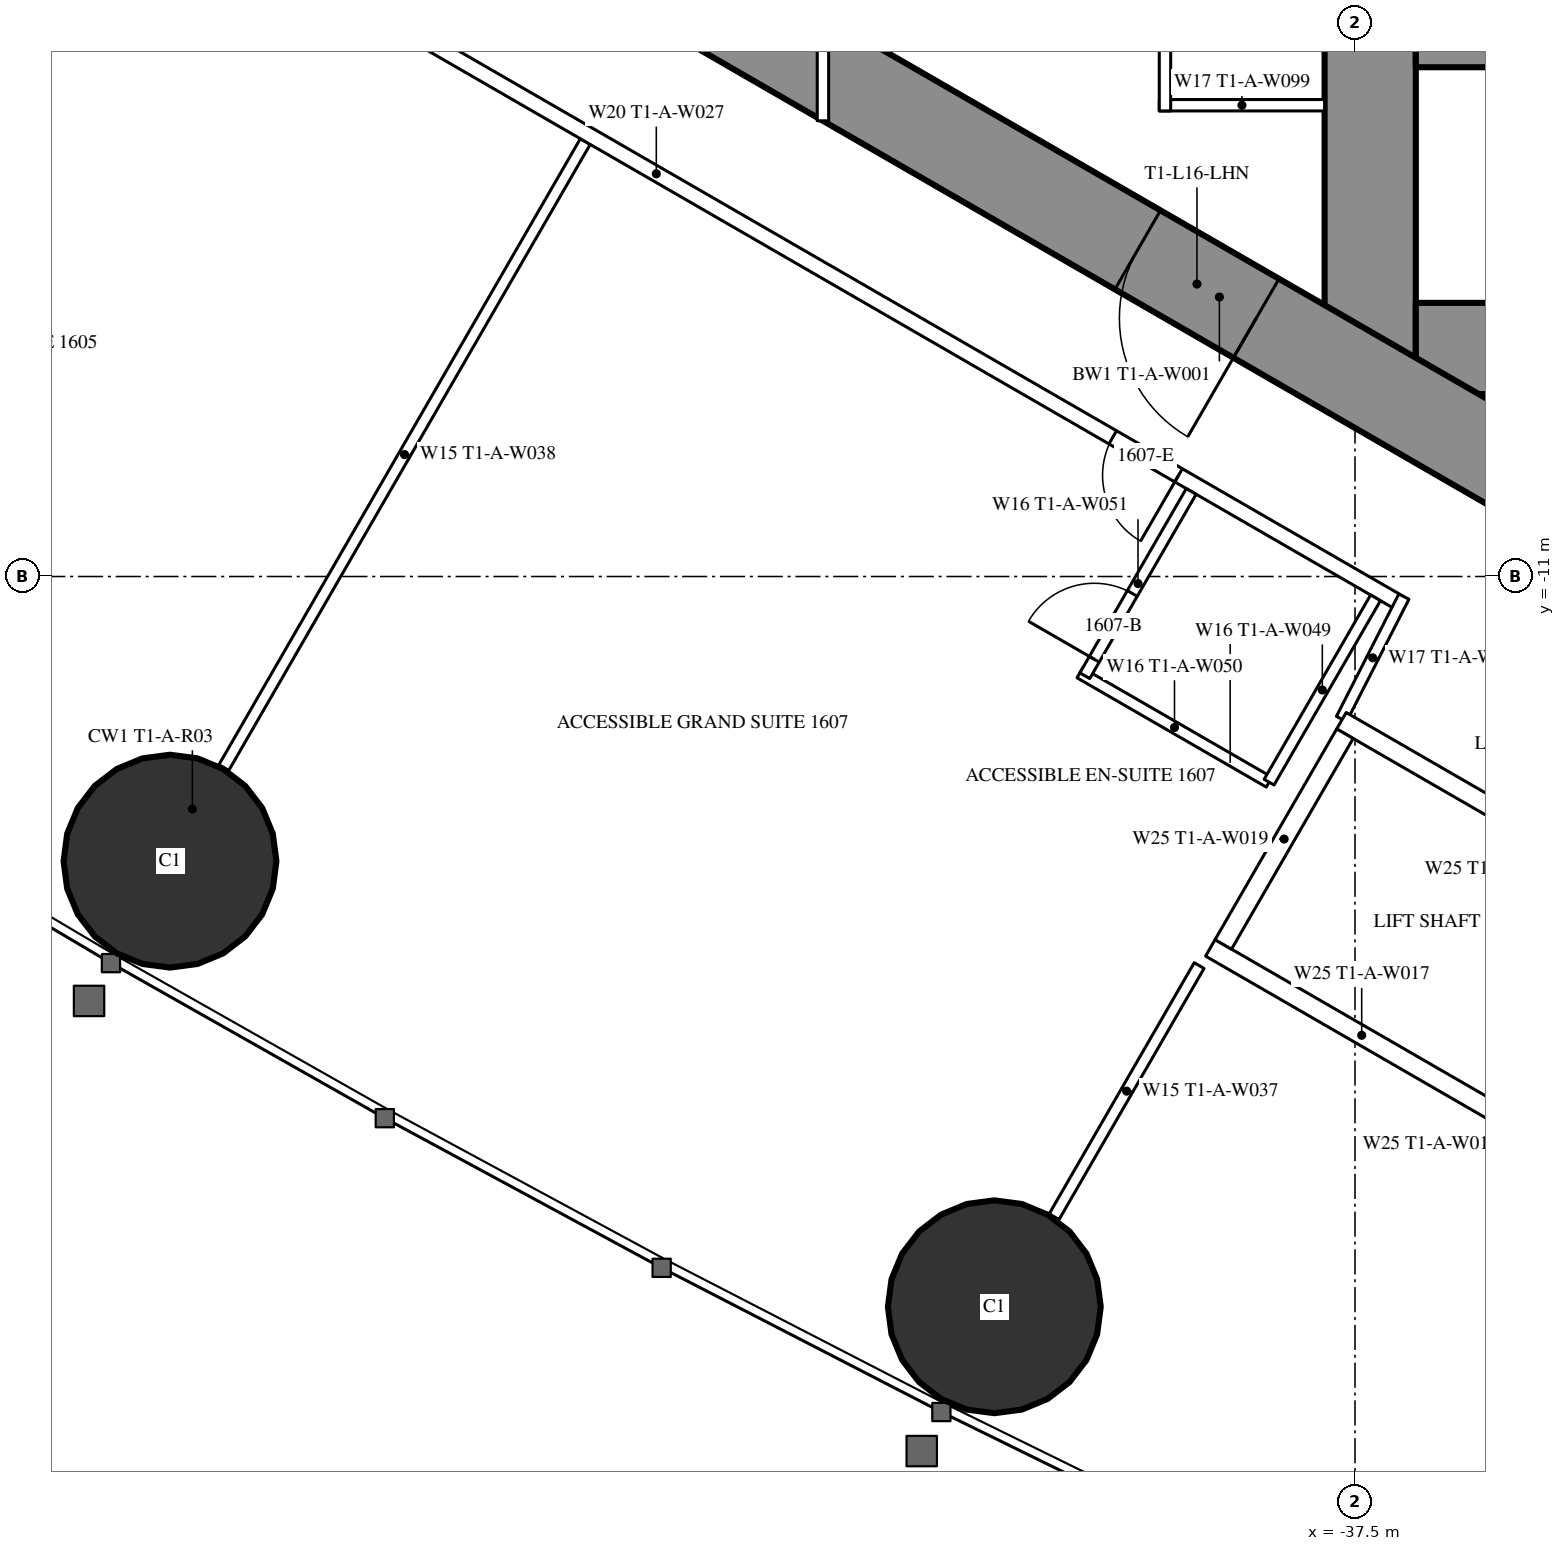
"""IFC4 building model, lengths in metres.
Left out: names, types, materials, properties, quantities, classifications, styles, units other than length and angle.
Written with IfcOpenShell. Run it as: python <this file> out.ifc"""

import sys

from ifc_helpers import new_model, si_unit, direction, frame, frame_2d, origin, origin_2d, place, context, subcontext, project, spatial, rectangle, hollow_circle, extrude, element, fill, save


model = new_model("IFC4")
c1 = context("Model", 3, precision=1e-05, world=origin(), true_north=direction((0.0, 1.0)))
c2 = subcontext(c1, "Body", "Model", "MODEL_VIEW")
j1 = project(units=[si_unit("LENGTHUNIT", "METRE"), si_unit("PLANEANGLEUNIT", "RADIAN")], contexts=[c1])
p1 = place(None, origin())
s1 = spatial("IfcSite", under=j1, at=p1, CompositionType="ELEMENT")
p2 = place(p1, origin())
s2 = spatial("IfcBuilding", under=s1, at=p2, CompositionType="ELEMENT")
p3 = place(p2, frame((0.0, 0.0, 63.5)))
s3 = spatial("IfcBuildingStorey", under=s2, at=p3, CompositionType="ELEMENT", Elevation=63.5)
for number, where, z_axis, x_axis in (
    (1, (-53.09, -14.745, 0.0), (0.0, 0.0, 1.0), (1.0, 0.0, 0.0)),
    (2, (-42.245, -20.607, 0.0), (0.0, 0.0, 1.0), (1.0, 0.0, 0.0)),
):
    element("IfcColumn", number, at=place(p3, frame(where, z_axis=z_axis, x_axis=x_axis)), inside=s3, PredefinedType="COLUMN", context=c2, shape_type="SweptSolid", body=[
        extrude(hollow_circle(Radius=1.4, WallThickness=0.12, at=origin_2d()), origin(), (0.0, 0.0, 1.0), 3.5),
    ])
p4 = place(p3, frame((-37.3, 8.6, 0.0), z_axis=(0.0, 0.0, 1.0), x_axis=(0.0, -1.0, 0.0)))
e3 = element("IfcWall", 3, at=p4, inside=s3, PredefinedType="SHEAR", context=c2, shape_type="SweptSolid", body=[
    extrude(rectangle(XDim=17.2, YDim=1.2, at=frame_2d((8.6, 0.0))), origin(), (0.0, 0.0, 1.0), 3.5),
])
p5 = place(p4, frame((7.7, 0.0, 0.0)))
e4 = element("IfcOpeningElement", 4, at=p5, cuts=e3, PredefinedType="OPENING", context=c2, shape_type="SweptSolid", body=[
    extrude(rectangle(XDim=1.8, YDim=2.2, at=frame_2d((0.9, 1.1))), frame((0.0, 0.61, 0.0), z_axis=(0.0, -1.0, 0.0), x_axis=(1.0, 0.0, 0.0)), (0.0, 0.0, 1.0), 1.22),
])
p6 = place(p3, frame((-28.3, -8.0, 0.0), z_axis=(0.0, 0.0, 1.0), x_axis=(-1.0, 0.0, 0.0)))
e5 = element("IfcWall", 5, at=p6, inside=s3, PredefinedType="SHEAR", context=c2, shape_type="SweptSolid", body=[
    extrude(rectangle(XDim=8.4, YDim=1.2, at=frame_2d((4.2, 0.0))), origin(), (0.0, 0.0, 1.0), 3.5),
])
p7 = place(p6, frame((0.25, 0.0, 0.0)))
e6 = element("IfcOpeningElement", 6, at=p7, cuts=e5, PredefinedType="OPENING", context=c2, shape_type="SweptSolid", body=[
    extrude(rectangle(XDim=1.0, YDim=2.2, at=frame_2d((0.5, 1.1))), frame((0.0, 0.61, 0.0), z_axis=(0.0, -1.0, 0.0), x_axis=(1.0, 0.0, 0.0)), (0.0, 0.0, 1.0), 1.22),
])
p8 = place(p3, frame((-28.3, -4.15, 0.0), z_axis=(0.0, 0.0, 1.0), x_axis=(-1.0, 0.0, 0.0)))
e7 = element("IfcWall", 7, at=p8, inside=s3, PredefinedType="SHEAR", context=c2, shape_type="SweptSolid", body=[
    extrude(rectangle(XDim=8.4, YDim=0.3, at=frame_2d((4.2, 0.0))), origin(), (0.0, 0.0, 1.0), 3.5),
])
p9 = place(p3, frame((-27.2, -14.3, 0.0), z_axis=(0.0, 0.0, 1.0), x_axis=(-0.866024021859, 0.500002393557, 0.0)))
e8 = element("IfcWall", 8, at=p9, inside=s3, PredefinedType="SHEAR", context=c2, shape_type="SweptSolid", body=[
    extrude(rectangle(XDim=27.907, YDim=1.2, at=frame_2d((13.954, 0.0))), origin(), (0.0, 0.0, 1.0), 3.5),
])
p10 = place(p9, frame((4.6, 0.0, 0.0)))
e9 = element("IfcOpeningElement", 9, at=p10, cuts=e8, PredefinedType="OPENING", context=c2, shape_type="SweptSolid", body=[
    extrude(rectangle(XDim=1.0, YDim=2.2, at=frame_2d((0.5, 1.1))), frame((0.0, 0.61, 0.0), z_axis=(0.0, -1.0, 0.0), x_axis=(1.0, 0.0, 0.0)), (0.0, 0.0, 1.0), 1.22),
])
p11 = place(p9, frame((13.395, 0.0, 0.0)))
e10 = element("IfcOpeningElement", 10, at=p11, cuts=e8, PredefinedType="OPENING", context=c2, shape_type="SweptSolid", body=[
    extrude(rectangle(XDim=1.8, YDim=2.2, at=frame_2d((0.9, 1.1))), frame((0.0, 0.61, 0.0), z_axis=(0.0, -1.0, 0.0), x_axis=(1.0, 0.0, 0.0)), (0.0, 0.0, 1.0), 1.22),
])
p12 = place(p3, frame((-47.627, -5.278, 0.0), z_axis=(0.0, 0.0, 1.0), x_axis=(-0.500009844318, -0.86601972009, 0.0)))
e11 = element("IfcWall", 11, at=p12, inside=s3, PredefinedType="PARTITIONING", context=c2, shape_type="SweptSolid", body=[
    extrude(rectangle(XDim=9.51, YDim=0.15, at=frame_2d((4.755, 0.0))), origin(), (0.0, 0.0, 1.0), 2.25),
])
p13 = place(p3, frame((-39.551, -16.118, 0.0), z_axis=(0.0, 0.0, 1.0), x_axis=(-0.499986503906, -0.866033195618, 0.0)))
e12 = element("IfcWall", 12, at=p13, inside=s3, PredefinedType="PARTITIONING", context=c2, shape_type="SweptSolid", body=[
    extrude(rectangle(XDim=3.815, YDim=0.15, at=frame_2d((1.907, 0.0))), origin(), (0.0, 0.0, 1.0), 3.25),
])
p14 = place(p3, frame((-36.92, -11.344, 0.0), z_axis=(0.0, 0.0, 1.0), x_axis=(-0.866028313256, 0.499994960614, 0.0)))
e13 = element("IfcWall", 13, at=p14, inside=s3, PredefinedType="PARTITIONING", context=c2, shape_type="SweptSolid", body=[
    extrude(rectangle(XDim=22.568, YDim=0.2, at=frame_2d((11.284, 0.0))), origin(), (0.0, 0.0, 1.0), 3.25),
])
p15 = place(p14, frame((18.668, 0.0, 0.0)))
e14 = element("IfcOpeningElement", 14, at=p15, cuts=e13, PredefinedType="OPENING", context=c2, shape_type="SweptSolid", body=[
    extrude(rectangle(XDim=0.95, YDim=2.2, at=frame_2d((0.475, 1.1))), frame((0.0, 0.11, 0.0), z_axis=(0.0, -1.0, 0.0), x_axis=(1.0, 0.0, 0.0)), (0.0, 0.0, 1.0), 0.22),
])
p16 = place(p14, frame((3.35, 0.0, 0.0)))
e15 = element("IfcOpeningElement", 15, at=p16, cuts=e13, PredefinedType="OPENING", context=c2, shape_type="SweptSolid", body=[
    extrude(rectangle(XDim=1.0, YDim=2.2, at=frame_2d((0.5, 1.1))), frame((0.0, 0.11, 0.0), z_axis=(0.0, -1.0, 0.0), x_axis=(1.0, 0.0, 0.0)), (0.0, 0.0, 1.0), 0.22),
])
p17 = place(p3, frame((-36.857, -11.265, 0.0), z_axis=(0.0, 0.0, 1.0), x_axis=(-0.454225294761, -0.890886851176, 0.0)))
e16 = element("IfcWall", 16, at=p17, inside=s3, PredefinedType="PARTITIONING", context=c2, shape_type="SweptSolid", body=[
    extrude(rectangle(XDim=1.807, YDim=0.15, at=frame_2d((0.904, 0.0))), origin(), (0.0, 0.0, 1.0), 3.25),
])
p18 = place(p3, frame((-38.63, -13.705, 0.0), z_axis=(0.0, 0.0, 1.0), x_axis=(-0.866018712932, 0.500011588718, 0.0)))
e17 = element("IfcWall", 17, at=p18, inside=s3, PredefinedType="PARTITIONING", context=c2, shape_type="SweptSolid", body=[
    extrude(rectangle(XDim=2.875, YDim=0.15, at=frame_2d((1.438, 0.0))), origin(), (0.0, 0.0, 1.0), 3.25),
])
p19 = place(p3, frame((-39.655, -9.88, 0.0), z_axis=(0.0, 0.0, 1.0), x_axis=(-0.500049511043, -0.865996816683, 0.0)))
e18 = element("IfcWall", 18, at=p19, inside=s3, PredefinedType="PARTITIONING", context=c2, shape_type="SweptSolid", body=[
    extrude(rectangle(XDim=2.8, YDim=0.15, at=frame_2d((1.4, 0.0))), origin(), (0.0, 0.0, 1.0), 3.25),
])
p20 = place(p19, frame((1.55, 0.0, 0.0)))
e19 = element("IfcOpeningElement", 19, at=p20, cuts=e18, PredefinedType="OPENING", context=c2, shape_type="SweptSolid", body=[
    extrude(rectangle(XDim=1.0, YDim=2.2, at=frame_2d((0.5, 1.1))), frame((0.0, 0.085, 0.0), z_axis=(0.0, -1.0, 0.0), x_axis=(1.0, 0.0, 0.0)), (0.0, 0.0, 1.0), 0.17),
])
p21 = place(p3, frame((-37.23, -11.281, 0.0), z_axis=(0.0, 0.0, 1.0), x_axis=(-0.500049511043, -0.865996816683, 0.0)))
e20 = element("IfcWall", 20, at=p21, inside=s3, PredefinedType="PARTITIONING", context=c2, shape_type="SweptSolid", body=[
    extrude(rectangle(XDim=2.8, YDim=0.15, at=frame_2d((1.4, 0.0))), origin(), (0.0, 0.0, 1.0), 3.25),
])
p22 = place(p3, frame((-37.9, -4.8, 0.0), z_axis=(0.0, 0.0, 1.0), x_axis=(-1.0, 0.0, 0.0)))
e21 = element("IfcWall", 21, at=p22, inside=s3, PredefinedType="PARTITIONING", context=c2, shape_type="SweptSolid", body=[
    extrude(rectangle(XDim=2.175, YDim=0.15, at=frame_2d((1.087, 0.0))), origin(), (0.0, 0.0, 1.0), 3.25),
])
p23 = place(p3, frame((-40.0, -1.125, 0.0), z_axis=(0.0, 0.0, 1.0), x_axis=(0.0, -1.0, 0.0)))
e22 = element("IfcWall", 22, at=p23, inside=s3, PredefinedType="PARTITIONING", context=c2, shape_type="SweptSolid", body=[
    extrude(rectangle(XDim=3.75, YDim=0.15, at=frame_2d((1.875, 0.0))), origin(), (0.0, 0.0, 1.0), 3.25),
])
p24 = place(p23, frame((1.375, 0.0, 0.0)))
e23 = element("IfcOpeningElement", 23, at=p24, cuts=e22, PredefinedType="OPENING", context=c2, shape_type="SweptSolid", body=[
    extrude(rectangle(XDim=1.0, YDim=2.2, at=frame_2d((0.5, 1.1))), frame((0.0, 0.085, 0.0), z_axis=(0.0, -1.0, 0.0), x_axis=(1.0, 0.0, 0.0)), (0.0, 0.0, 1.0), 0.17),
])
p25 = place(p3, frame((-44.5, 5.005, 0.0), z_axis=(0.0, 0.0, 1.0), x_axis=(0.0, -1.0, 0.0)))
e24 = element("IfcWall", 24, at=p25, inside=s3, PredefinedType="PARTITIONING", context=c2, shape_type="SweptSolid", body=[
    extrude(rectangle(XDim=10.009, YDim=0.15, at=frame_2d((5.005, 0.0))), origin(), (0.0, 0.0, 1.0), 2.45),
])
p26 = place(p25, frame((2.002, 0.0, 0.0)))
e25 = element("IfcOpeningElement", 25, at=p26, cuts=e24, PredefinedType="OPENING", context=c2, shape_type="SweptSolid", body=[
    extrude(rectangle(XDim=1.0, YDim=2.2, at=frame_2d((0.5, 1.1))), frame((0.0, 0.085, 0.0), z_axis=(0.0, -1.0, 0.0), x_axis=(1.0, 0.0, 0.0)), (0.0, 0.0, 1.0), 0.17),
])
p27 = place(p25, frame((7.007, 0.0, 0.0)))
e26 = element("IfcOpeningElement", 26, at=p27, cuts=e24, PredefinedType="OPENING", context=c2, shape_type="SweptSolid", body=[
    extrude(rectangle(XDim=1.0, YDim=2.2, at=frame_2d((0.5, 1.1))), frame((0.0, 0.085, 0.0), z_axis=(0.0, -1.0, 0.0), x_axis=(1.0, 0.0, 0.0)), (0.0, 0.0, 1.0), 0.17),
])
p28 = place(p3, frame((-33.696, -15.197, 0.0), z_axis=(0.0, 0.0, 1.0), x_axis=(-0.865976953817, 0.500083908417, 0.0)))
e27 = element("IfcWall", 27, at=p28, inside=s3, PredefinedType="PARTITIONING", context=c2, shape_type="SweptSolid", body=[
    extrude(rectangle(XDim=4.599, YDim=0.25, at=frame_2d((2.3, 0.0))), origin(), (0.0, 0.0, 1.0), 3.25),
])
p29 = place(p3, frame((-35.42, -18.186, 0.0), z_axis=(0.0, 0.0, 1.0), x_axis=(-0.865990227814, 0.50006092162, 0.0)))
e28 = element("IfcWall", 28, at=p29, inside=s3, PredefinedType="PARTITIONING", context=c2, shape_type="SweptSolid", body=[
    extrude(rectangle(XDim=4.6, YDim=0.25, at=frame_2d((2.3, 0.0))), origin(), (0.0, 0.0, 1.0), 3.25),
])
p30 = place(p3, frame((-37.633, -13.068, 0.0), z_axis=(0.0, 0.0, 1.0), x_axis=(-0.499872130319, -0.866099216793, 0.0)))
e29 = element("IfcWall", 29, at=p30, inside=s3, PredefinedType="PARTITIONING", context=c2, shape_type="SweptSolid", body=[
    extrude(rectangle(XDim=3.2, YDim=0.25, at=frame_2d((1.6, 0.0))), origin(), (0.0, 0.0, 1.0), 3.25),
])
p31 = place(p20, origin())
e30 = element("IfcDoor", 30, at=p31, inside=s3, OperationType="SINGLE_SWING_RIGHT", PredefinedType="DOOR", context=c2, shape_type="SweptSolid", body=[
    extrude(rectangle(XDim=1.0, YDim=2.2, at=frame_2d((0.5, 1.1))), frame((0.0, 0.025, 0.0), z_axis=(0.0, -1.0, 0.0), x_axis=(1.0, 0.0, 0.0)), (0.0, 0.0, 1.0), 0.05),
])
fill(e19, e30)
p32 = place(p16, origin())
e31 = element("IfcDoor", 31, at=p32, inside=s3, OperationType="SINGLE_SWING_LEFT", PredefinedType="DOOR", context=c2, shape_type="SweptSolid", body=[
    extrude(rectangle(XDim=1.0, YDim=2.2, at=frame_2d((0.5, 1.1))), frame((0.0, 0.025, 0.0), z_axis=(0.0, -1.0, 0.0), x_axis=(1.0, 0.0, 0.0)), (0.0, 0.0, 1.0), 0.05),
])
fill(e15, e31)
p33 = place(p11, origin())
e32 = element("IfcDoor", 32, at=p33, inside=s3, OperationType="DOUBLE_DOOR_SINGLE_SWING", PredefinedType="DOOR", context=c2, shape_type="SweptSolid", body=[
    extrude(rectangle(XDim=1.8, YDim=2.2, at=frame_2d((0.9, 1.1))), frame((0.0, 0.025, 0.0), z_axis=(0.0, -1.0, 0.0), x_axis=(1.0, 0.0, 0.0)), (0.0, 0.0, 1.0), 0.05),
])
fill(e10, e32)
save(model, sys.argv[1])
